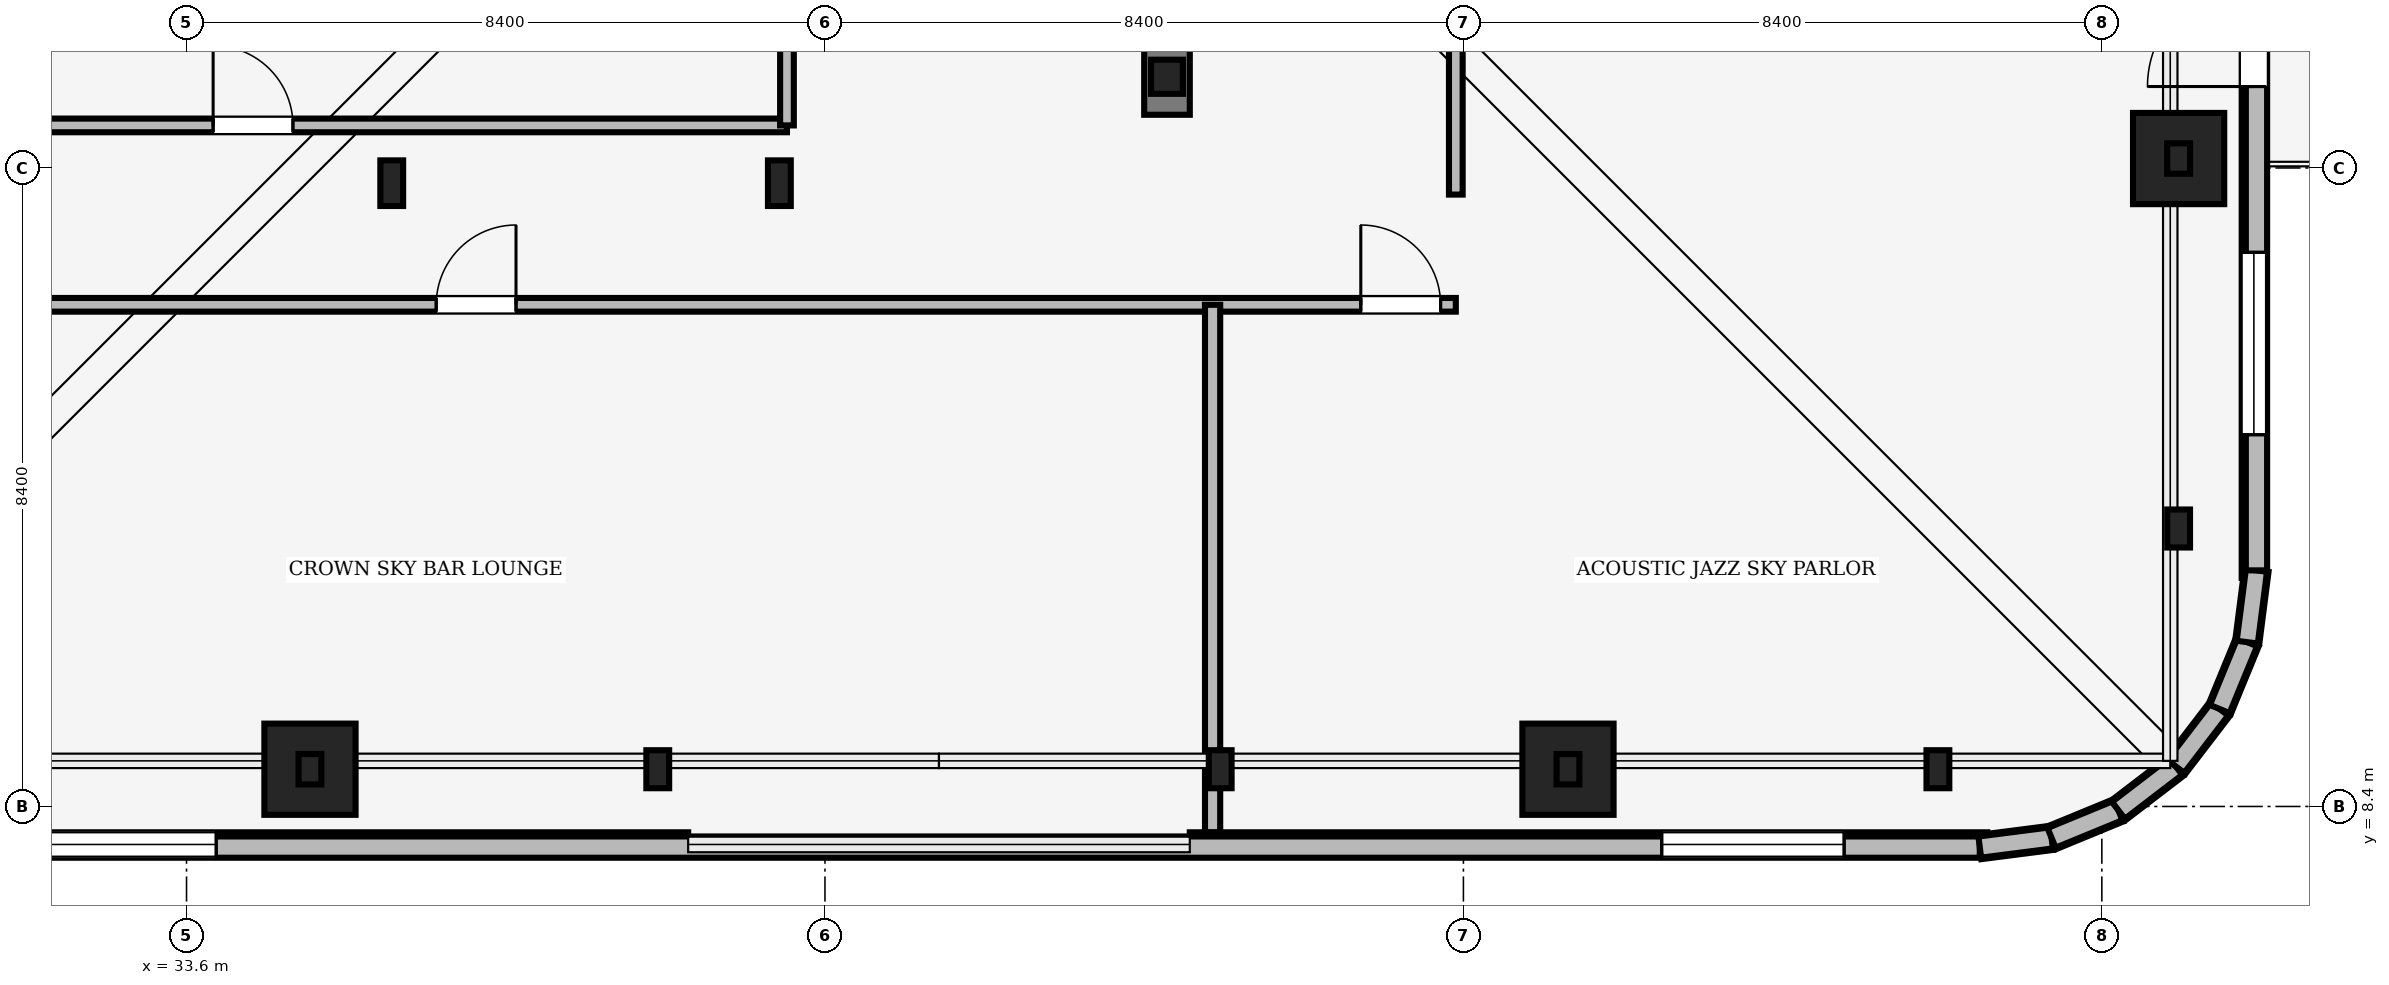
"""IFC4 building model, lengths in metres.
Left out: names, types, materials, properties, quantities, classifications, styles, units other than length and angle.
Written with IfcOpenShell. Run it as: python <this file> out.ifc"""

import sys

from ifc_helpers import new_model, si_unit, direction, frame, frame_2d, origin, origin_2d, place, context, subcontext, project, spatial, rectangle, i_section, extrude, source, transform, mapped, element, fill, save


model = new_model("IFC4")
c1 = context("Model", 3, precision=1e-05, world=origin(), true_north=direction((0.0, 1.0)))
c2 = subcontext(c1, "Body", "Model", "MODEL_VIEW")
j1 = project(units=[si_unit("LENGTHUNIT", "METRE"), si_unit("PLANEANGLEUNIT", "RADIAN")], contexts=[c1])
p1 = place(None, origin())
s1 = spatial("IfcSite", under=j1, at=p1, CompositionType="ELEMENT")
p2 = place(p1, origin())
s2 = spatial("IfcBuilding", under=s1, at=p2, CompositionType="ELEMENT")
p3 = place(p2, frame((0.0, 0.0, 301.15)))
s3 = spatial("IfcBuildingStorey", under=s2, at=p3, CompositionType="ELEMENT", Elevation=301.15)
m1 = source(origin(), c2, "Body", "SweptSolid", [
    extrude(rectangle(XDim=13.15, YDim=0.6, at=frame_2d((6.575, 0.0))), origin(), (0.0, 0.0, 1.0), 4.7),
])
p4 = place(p3, frame((46.5, 17.5, 0.0), z_axis=(0.0, 0.0, 1.0), x_axis=(0.0, 1.0, 0.0)))
e1 = element("IfcWall", 1, at=p4, inside=s3, PredefinedType="SHEAR", context=c2, shape_type="MappedRepresentation", body=[
    mapped(m1, transform((0.0, 0.0, 0.0), scale=1.0)),
])
m2 = source(origin(), c2, "Body", "SweptSolid", [
    extrude(i_section(OverallWidth=0.3, OverallDepth=0.6, WebThickness=0.015, FlangeThickness=0.03, FilletRadius=0.027, at=origin_2d()), origin(), (0.0, 0.0, 1.0), 4.6),
])
for number, where, z_axis, x_axis in (
    (2, (36.3, 16.6, 0.0), (0.0, 0.0, 1.0), (1.0, 0.0, 0.0)),
    (3, (41.4, 16.6, 0.0), (0.0, 0.0, 1.0), (1.0, 0.0, 0.0)),
):
    element("IfcColumn", number, at=place(p3, frame(where, z_axis=z_axis, x_axis=x_axis)), inside=s3, PredefinedType="COLUMN", context=c2, shape_type="MappedRepresentation", body=[
        mapped(m2, transform((0.0, 0.0, 0.0), scale=1.0)),
    ])
m3 = source(origin(), c2, "Body", "SweptSolid", [
    extrude(rectangle(XDim=1.2, YDim=1.2, at=origin_2d()), origin(), (0.0, 0.0, 1.0), 4.6),
])
for number, where, z_axis, x_axis in (
    (4, (35.224, 8.89, 0.0), (0.0, 0.0, 1.0), (1.0, 0.0, 0.0)),
    (5, (51.776, 8.89, 0.0), (0.0, 0.0, 1.0), (1.0, 0.0, 0.0)),
    (6, (59.81, 16.924, 0.0), (0.0, 0.0, 1.0), (1.0, 0.0, 0.0)),
):
    element("IfcColumn", number, at=place(p3, frame(where, z_axis=z_axis, x_axis=x_axis)), inside=s3, PredefinedType="COLUMN", context=c2, shape_type="MappedRepresentation", body=[
        mapped(m3, transform((0.0, 0.0, 0.0), scale=1.0)),
    ])
m4 = source(origin(), c2, "Body", "SweptSolid", [
    extrude(i_section(OverallWidth=0.3, OverallDepth=0.5, WebThickness=0.014, FlangeThickness=0.028, FilletRadius=0.027, at=origin_2d()), origin(), (0.0, 0.0, 1.0), 4.6),
])
for number, where, z_axis, x_axis in (
    (7, (39.8, 8.89, 0.0), (0.0, 0.0, 1.0), (1.0, 0.0, 0.0)),
    (8, (47.2, 8.89, 0.0), (0.0, 0.0, 1.0), (1.0, 0.0, 0.0)),
    (9, (56.643, 8.89, 0.0), (0.0, 0.0, 1.0), (1.0, 0.0, 0.0)),
    (10, (59.81, 12.057, 0.0), (0.0, 0.0, 1.0), (1.0, 0.0, 0.0)),
):
    element("IfcColumn", number, at=place(p3, frame(where, z_axis=z_axis, x_axis=x_axis)), inside=s3, PredefinedType="COLUMN", context=c2, shape_type="MappedRepresentation", body=[
        mapped(m4, transform((0.0, 0.0, 0.0), scale=1.0)),
    ])
m5 = source(origin(), c2, "Body", "SweptSolid", [
    extrude(i_section(OverallWidth=0.3, OverallDepth=0.4, WebThickness=0.013, FlangeThickness=0.024, FilletRadius=0.027, at=origin_2d()), origin(), (0.0, 0.0, 1.0), 12.85),
])
for number, where, z_axis, x_axis in (
    (11, (35.224, 8.89, 5.0), (0.0, 0.0, 1.0), (1.0, 0.0, 0.0)),
    (12, (51.776, 8.89, 5.0), (0.0, 0.0, 1.0), (1.0, 0.0, 0.0)),
    (13, (59.81, 16.924, 5.0), (0.0, 0.0, 1.0), (1.0, 0.0, 0.0)),
):
    element("IfcColumn", number, at=place(p3, frame(where, z_axis=z_axis, x_axis=x_axis)), inside=s3, PredefinedType="COLUMN", context=c2, shape_type="MappedRepresentation", body=[
        mapped(m5, transform((0.0, 0.0, 0.0), scale=1.0)),
    ])
m6 = source(origin(), c2, "Body", "SweptSolid", [
    extrude(i_section(OverallWidth=0.419, OverallDepth=0.449, WebThickness=0.031, FlangeThickness=0.048, FilletRadius=0.015, at=origin_2d()), origin(), (0.0, 0.0, 1.0), 4.6),
])
p5 = place(p3, frame((46.5, 18.0, 0.0), z_axis=(0.0, 0.0, 1.0), x_axis=(1.0, 0.0, 0.0)))
e14 = element("IfcColumn", 14, at=p5, inside=s3, PredefinedType="COLUMN", context=c2, shape_type="MappedRepresentation", body=[
    mapped(m6, transform((0.0, 0.0, 0.0), scale=1.0)),
])
m7 = source(origin(), c2, "Body", "SweptSolid", [
    extrude(rectangle(XDim=10.493, YDim=0.32, at=frame_2d((5.247, 0.0))), origin(), (0.0, 0.0, 1.0), 4.6),
])
p6 = place(p3, frame((29.707, 7.9, 0.0), z_axis=(0.0, 0.0, 1.0), x_axis=(1.0, 0.0, 0.0)))
e15 = element("IfcWall", 15, at=p6, inside=s3, PredefinedType="SOLIDWALL", context=c2, shape_type="MappedRepresentation", body=[
    mapped(m7, transform((0.0, 0.0, 0.0), scale=1.0)),
])
m8 = source(origin(), c2, "Body", "SweptSolid", [
    extrude(rectangle(XDim=2.4, YDim=3.2, at=frame_2d((1.2, 1.6))), frame((0.0, 0.17, 0.0), z_axis=(0.0, -1.0, 0.0), x_axis=(1.0, 0.0, 0.0)), (0.0, 0.0, 1.0), 0.34),
])
p7 = place(p6, frame((1.884, 0.0, 0.72)))
e16 = element("IfcOpeningElement", 16, at=p7, cuts=e15, PredefinedType="OPENING", context=c2, shape_type="MappedRepresentation", body=[
    mapped(m8, transform((0.0, 0.0, 0.0), scale=1.0)),
])
p8 = place(p3, frame((46.8, 7.9, 0.0), z_axis=(0.0, 0.0, 1.0), x_axis=(1.0, 0.0, 0.0)))
e17 = element("IfcWall", 17, at=p8, inside=s3, PredefinedType="SOLIDWALL", context=c2, shape_type="MappedRepresentation", body=[
    mapped(m7, transform((0.0, 0.0, 0.0), scale=1.0)),
])
p9 = place(p8, frame((6.209, 0.0, 0.72)))
e18 = element("IfcOpeningElement", 18, at=p9, cuts=e17, PredefinedType="OPENING", context=c2, shape_type="MappedRepresentation", body=[
    mapped(m8, transform((0.0, 0.0, 0.0), scale=1.0)),
])
p10 = place(p3, frame((60.8, 11.407, 0.0), z_axis=(0.0, 0.0, 1.0), x_axis=(0.0, 1.0, 0.0)))
e19 = element("IfcWall", 19, at=p10, inside=s3, PredefinedType="SOLIDWALL", context=c2, shape_type="MappedRepresentation", body=[
    mapped(m7, transform((0.0, 0.0, 0.0), scale=1.0)),
])
m9 = source(origin(), c2, "Body", "SweptSolid", [
    extrude(rectangle(XDim=1.4, YDim=2.3, at=frame_2d((0.7, 1.15))), frame((0.0, 0.17, 0.0), z_axis=(0.0, -1.0, 0.0), x_axis=(1.0, 0.0, 0.0)), (0.0, 0.0, 1.0), 0.34),
])
p11 = place(p10, frame((6.465, 0.0, 0.0)))
e20 = element("IfcOpeningElement", 20, at=p11, cuts=e19, PredefinedType="OPENING", context=c2, shape_type="MappedRepresentation", body=[
    mapped(m9, transform((0.0, 0.0, 0.0), scale=1.0)),
])
p12 = place(p10, frame((1.884, 0.0, 0.72)))
e21 = element("IfcOpeningElement", 21, at=p12, cuts=e19, PredefinedType="OPENING", context=c2, shape_type="MappedRepresentation", body=[
    mapped(m8, transform((0.0, 0.0, 0.0), scale=1.0)),
])
m10 = source(origin(), c2, "Body", "SweptSolid", [
    extrude(rectangle(XDim=0.952, YDim=0.32, at=frame_2d((0.476, 0.0))), origin(), (0.0, 0.0, 1.0), 4.6),
])
p13 = place(p3, frame((57.194, 7.865, 0.0), z_axis=(0.0, 0.0, 1.0), x_axis=(0.991850128376, 0.127410057845, 0.0)))
e22 = element("IfcWall", 22, at=p13, inside=s3, PredefinedType="SOLIDWALL", context=c2, shape_type="MappedRepresentation", body=[
    mapped(m10, transform((0.0, 0.0, 0.0), scale=1.0)),
])
m11 = source(origin(), c2, "Body", "SweptSolid", [
    extrude(rectangle(XDim=0.951, YDim=0.32, at=frame_2d((0.476, 0.0))), origin(), (0.0, 0.0, 1.0), 4.6),
])
p14 = place(p3, frame((58.138, 7.987, 0.0), z_axis=(0.0, 0.0, 1.0), x_axis=(0.924731243055, 0.380620714252, 0.0)))
e23 = element("IfcWall", 23, at=p14, inside=s3, PredefinedType="SOLIDWALL", context=c2, shape_type="MappedRepresentation", body=[
    mapped(m11, transform((0.0, 0.0, 0.0), scale=1.0)),
])
m12 = source(origin(), c2, "Body", "SweptSolid", [
    extrude(rectangle(XDim=0.951, YDim=0.32, at=frame_2d((0.475, 0.0))), origin(), (0.0, 0.0, 1.0), 4.6),
])
for number, where, z_axis, x_axis in (
    (24, (59.018, 8.349, 0.0), (0.0, 0.0, 1.0), (0.794, 0.608, 0.0)),
    (25, (59.773, 8.927, 0.0), (0.0, 0.0, 1.0), (0.608, 0.794, 0.0)),
):
    element("IfcWall", number, at=place(p3, frame(where, z_axis=z_axis, x_axis=x_axis)), inside=s3, PredefinedType="SOLIDWALL", context=c2, shape_type="MappedRepresentation", body=[
        mapped(m12, transform((0.0, 0.0, 0.0), scale=1.0)),
    ])
p15 = place(p3, frame((60.351, 9.682, 0.0), z_axis=(0.0, 0.0, 1.0), x_axis=(0.380620714252, 0.924731243055, 0.0)))
e26 = element("IfcWall", 26, at=p15, inside=s3, PredefinedType="SOLIDWALL", context=c2, shape_type="MappedRepresentation", body=[
    mapped(m11, transform((0.0, 0.0, 0.0), scale=1.0)),
])
p16 = place(p3, frame((60.713, 10.562, 0.0), z_axis=(0.0, 0.0, 1.0), x_axis=(0.127410057845, 0.991850128376, 0.0)))
e27 = element("IfcWall", 27, at=p16, inside=s3, PredefinedType="SOLIDWALL", context=c2, shape_type="MappedRepresentation", body=[
    mapped(m10, transform((0.0, 0.0, 0.0), scale=1.0)),
])
m13 = source(origin(), c2, "Body", "SweptSolid", [
    extrude(rectangle(XDim=27.388, YDim=0.28, at=frame_2d((13.694, 0.0))), origin(), (0.0, 0.0, 1.0), 1.15),
])
p17 = place(p3, frame((29.806, 7.865, 5.0), z_axis=(0.0, 0.0, 1.0), x_axis=(1.0, 0.0, 0.0)))
e28 = element("IfcWall", 28, at=p17, inside=s3, PredefinedType="SOLIDWALL", context=c2, shape_type="MappedRepresentation", body=[
    mapped(m13, transform((0.0, 0.0, 0.0), scale=1.0)),
])
m14 = source(origin(), c2, "Body", "SweptSolid", [
    extrude(rectangle(XDim=0.952, YDim=0.28, at=frame_2d((0.476, 0.0))), origin(), (0.0, 0.0, 1.0), 1.15),
])
p18 = place(p3, frame((57.194, 7.865, 5.0), z_axis=(0.0, 0.0, 1.0), x_axis=(0.991850128376, 0.127410057845, 0.0)))
e29 = element("IfcWall", 29, at=p18, inside=s3, PredefinedType="SOLIDWALL", context=c2, shape_type="MappedRepresentation", body=[
    mapped(m14, transform((0.0, 0.0, 0.0), scale=1.0)),
])
m15 = source(origin(), c2, "Body", "SweptSolid", [
    extrude(rectangle(XDim=0.951, YDim=0.28, at=frame_2d((0.476, 0.0))), origin(), (0.0, 0.0, 1.0), 1.15),
])
p19 = place(p3, frame((58.138, 7.987, 5.0), z_axis=(0.0, 0.0, 1.0), x_axis=(0.924731243055, 0.380620714252, 0.0)))
e30 = element("IfcWall", 30, at=p19, inside=s3, PredefinedType="SOLIDWALL", context=c2, shape_type="MappedRepresentation", body=[
    mapped(m15, transform((0.0, 0.0, 0.0), scale=1.0)),
])
m16 = source(origin(), c2, "Body", "SweptSolid", [
    extrude(rectangle(XDim=0.951, YDim=0.28, at=frame_2d((0.475, 0.0))), origin(), (0.0, 0.0, 1.0), 1.15),
])
for number, where, z_axis, x_axis in (
    (31, (59.018, 8.349, 5.0), (0.0, 0.0, 1.0), (0.794, 0.608, 0.0)),
    (32, (59.773, 8.927, 5.0), (0.0, 0.0, 1.0), (0.608, 0.794, 0.0)),
):
    element("IfcWall", number, at=place(p3, frame(where, z_axis=z_axis, x_axis=x_axis)), inside=s3, PredefinedType="SOLIDWALL", context=c2, shape_type="MappedRepresentation", body=[
        mapped(m16, transform((0.0, 0.0, 0.0), scale=1.0)),
    ])
p20 = place(p3, frame((60.351, 9.682, 5.0), z_axis=(0.0, 0.0, 1.0), x_axis=(0.380620714252, 0.924731243055, 0.0)))
e33 = element("IfcWall", 33, at=p20, inside=s3, PredefinedType="SOLIDWALL", context=c2, shape_type="MappedRepresentation", body=[
    mapped(m15, transform((0.0, 0.0, 0.0), scale=1.0)),
])
p21 = place(p3, frame((60.713, 10.562, 5.0), z_axis=(0.0, 0.0, 1.0), x_axis=(0.127410057845, 0.991850128376, 0.0)))
e34 = element("IfcWall", 34, at=p21, inside=s3, PredefinedType="SOLIDWALL", context=c2, shape_type="MappedRepresentation", body=[
    mapped(m14, transform((0.0, 0.0, 0.0), scale=1.0)),
])
p22 = place(p3, frame((60.834, 11.506, 5.0), z_axis=(0.0, 0.0, 1.0), x_axis=(0.0, 1.0, 0.0)))
e35 = element("IfcWall", 35, at=p22, inside=s3, PredefinedType="SOLIDWALL", context=c2, shape_type="MappedRepresentation", body=[
    mapped(m13, transform((0.0, 0.0, 0.0), scale=1.0)),
])
m17 = source(origin(), c2, "Body", "SweptSolid", [
    extrude(rectangle(XDim=25.888, YDim=0.18, at=frame_2d((12.944, 0.0))), origin(), (0.0, 0.0, 1.0), 4.142),
])
p23 = place(p3, frame((50.3, 16.45, 0.0), z_axis=(0.0, 0.0, 1.0), x_axis=(0.0, 1.0, 0.0)))
e36 = element("IfcWall", 36, at=p23, inside=s3, PredefinedType="PARTITIONING", context=c2, shape_type="MappedRepresentation", body=[
    mapped(m17, transform((0.0, 0.0, 0.0), scale=1.0)),
])
m18 = source(origin(), c2, "Body", "SweptSolid", [
    extrude(rectangle(XDim=1.05, YDim=2.2, at=frame_2d((0.525, 1.1))), frame((0.0, 0.1, 0.0), z_axis=(0.0, -1.0, 0.0), x_axis=(1.0, 0.0, 0.0)), (0.0, 0.0, 1.0), 0.2),
])
p24 = place(p23, frame((2.88, 0.0, 0.0)))
e37 = element("IfcOpeningElement", 37, at=p24, cuts=e36, PredefinedType="OPENING", context=c2, shape_type="MappedRepresentation", body=[
    mapped(m18, transform((0.0, 0.0, 0.0), scale=1.0)),
])
p25 = place(p23, frame((9.53, 0.0, 0.0)))
e38 = element("IfcOpeningElement", 38, at=p25, cuts=e36, PredefinedType="OPENING", context=c2, shape_type="MappedRepresentation", body=[
    mapped(m18, transform((0.0, 0.0, 0.0), scale=1.0)),
])
p26 = place(p23, frame((15.83, 0.0, 0.0)))
e39 = element("IfcOpeningElement", 39, at=p26, cuts=e36, PredefinedType="OPENING", context=c2, shape_type="MappedRepresentation", body=[
    mapped(m18, transform((0.0, 0.0, 0.0), scale=1.0)),
])
p27 = place(p23, frame((22.085, 0.0, 0.0)))
e40 = element("IfcOpeningElement", 40, at=p27, cuts=e36, PredefinedType="OPENING", context=c2, shape_type="MappedRepresentation", body=[
    mapped(m18, transform((0.0, 0.0, 0.0), scale=1.0)),
])
m19 = source(origin(), c2, "Body", "SweptSolid", [
    extrude(rectangle(XDim=23.938, YDim=0.18, at=frame_2d((11.969, 0.0))), origin(), (0.0, 0.0, 1.0), 4.142),
])
p28 = place(p3, frame((26.362, 15.0, 0.0), z_axis=(0.0, 0.0, 1.0), x_axis=(1.0, 0.0, 0.0)))
e41 = element("IfcWall", 41, at=p28, inside=s3, PredefinedType="PARTITIONING", context=c2, shape_type="MappedRepresentation", body=[
    mapped(m19, transform((0.0, 0.0, 0.0), scale=1.0)),
])
p29 = place(p28, frame((10.523, 0.0, 0.0)))
e42 = element("IfcOpeningElement", 42, at=p29, cuts=e41, PredefinedType="OPENING", context=c2, shape_type="MappedRepresentation", body=[
    mapped(m18, transform((0.0, 0.0, 0.0), scale=1.0)),
])
p30 = place(p28, frame((22.688, 0.0, 0.0)))
e43 = element("IfcOpeningElement", 43, at=p30, cuts=e41, PredefinedType="OPENING", context=c2, shape_type="MappedRepresentation", body=[
    mapped(m18, transform((0.0, 0.0, 0.0), scale=1.0)),
])
m20 = source(origin(), c2, "Body", "SweptSolid", [
    extrude(rectangle(XDim=13.05, YDim=0.18, at=frame_2d((6.525, 0.0))), origin(), (0.0, 0.0, 1.0), 2.792),
])
p31 = place(p3, frame((28.45, 17.36, 0.0), z_axis=(0.0, 0.0, 1.0), x_axis=(1.0, 0.0, 0.0)))
e44 = element("IfcWall", 44, at=p31, inside=s3, PredefinedType="PARTITIONING", context=c2, shape_type="MappedRepresentation", body=[
    mapped(m20, transform((0.0, 0.0, 0.0), scale=1.0)),
])
p32 = place(p31, frame((5.5, 0.0, 0.0)))
e45 = element("IfcOpeningElement", 45, at=p32, cuts=e44, PredefinedType="OPENING", context=c2, shape_type="MappedRepresentation", body=[
    mapped(m18, transform((0.0, 0.0, 0.0), scale=1.0)),
])
m21 = source(origin(), c2, "Body", "SweptSolid", [
    extrude(rectangle(XDim=6.938, YDim=0.2, at=frame_2d((3.469, 0.0))), origin(), (0.0, 0.0, 1.0), 4.142),
])
p33 = place(p3, frame((47.1, 8.062, 0.0), z_axis=(0.0, 0.0, 1.0), x_axis=(0.0, 1.0, 0.0)))
e46 = element("IfcWall", 46, at=p33, inside=s3, PredefinedType="PARTITIONING", context=c2, shape_type="MappedRepresentation", body=[
    mapped(m21, transform((0.0, 0.0, 0.0), scale=1.0)),
])
m22 = source(origin(), c2, "Body", "SweptSolid", [
    extrude(rectangle(XDim=2.94, YDim=0.18, at=frame_2d((1.47, 0.0))), origin(), (0.0, 0.0, 1.0), 2.792),
])
p34 = place(p3, frame((41.5, 17.36, 0.0), z_axis=(0.0, 0.0, 1.0), x_axis=(0.0, 1.0, 0.0)))
e47 = element("IfcWall", 47, at=p34, inside=s3, PredefinedType="PARTITIONING", context=c2, shape_type="MappedRepresentation", body=[
    mapped(m22, transform((0.0, 0.0, 0.0), scale=1.0)),
])
m23 = source(origin(), c2, "Body", "SweptSolid", [
    extrude(rectangle(XDim=2.4, YDim=3.2, at=frame_2d((1.2, 1.6))), frame((0.0, 0.03, 0.0), z_axis=(0.0, -1.0, 0.0), x_axis=(1.0, 0.0, 0.0)), (0.0, 0.0, 1.0), 0.06),
])
p35 = place(p7, origin())
e48 = element("IfcWindow", 48, at=p35, inside=s3, PartitioningType="SINGLE_PANEL", PredefinedType="WINDOW", context=c2, shape_type="MappedRepresentation", body=[
    mapped(m23, transform((0.0, 0.0, 0.0), scale=1.0)),
])
fill(e16, e48)
p36 = place(p9, origin())
e49 = element("IfcWindow", 49, at=p36, inside=s3, PartitioningType="SINGLE_PANEL", PredefinedType="WINDOW", context=c2, shape_type="MappedRepresentation", body=[
    mapped(m23, transform((0.0, 0.0, 0.0), scale=1.0)),
])
fill(e18, e49)
m24 = source(origin(), c2, "Body", "SweptSolid", [
    extrude(rectangle(XDim=1.4, YDim=2.3, at=frame_2d((0.7, 1.15))), frame((0.0, 0.025, 0.0), z_axis=(0.0, -1.0, 0.0), x_axis=(1.0, 0.0, 0.0)), (0.0, 0.0, 1.0), 0.05),
])
p37 = place(p11, frame((1.4, 0.0, 0.0), z_axis=(0.0, 0.0, 1.0), x_axis=(-1.0, 0.0, 0.0)))
e50 = element("IfcDoor", 50, at=p37, inside=s3, OperationType="DOUBLE_DOOR_SLIDING", PredefinedType="DOOR", context=c2, shape_type="MappedRepresentation", body=[
    mapped(m24, transform((0.0, 0.0, 0.0), scale=1.0)),
])
fill(e20, e50)
p38 = place(p12, origin())
e51 = element("IfcWindow", 51, at=p38, inside=s3, PartitioningType="SINGLE_PANEL", PredefinedType="WINDOW", context=c2, shape_type="MappedRepresentation", body=[
    mapped(m23, transform((0.0, 0.0, 0.0), scale=1.0)),
])
fill(e21, e51)
m25 = source(origin(), c2, "Body", "SweptSolid", [
    extrude(rectangle(XDim=1.05, YDim=2.2, at=frame_2d((0.525, 1.1))), frame((0.0, 0.025, 0.0), z_axis=(0.0, -1.0, 0.0), x_axis=(1.0, 0.0, 0.0)), (0.0, 0.0, 1.0), 0.05),
])
p39 = place(p29, origin())
e52 = element("IfcDoor", 52, at=p39, inside=s3, OperationType="SINGLE_SWING_RIGHT", PredefinedType="DOOR", context=c2, shape_type="MappedRepresentation", body=[
    mapped(m25, transform((0.0, 0.0, 0.0), scale=1.0)),
])
fill(e42, e52)
p40 = place(p30, origin())
e53 = element("IfcDoor", 53, at=p40, inside=s3, OperationType="SINGLE_SWING_LEFT", PredefinedType="DOOR", context=c2, shape_type="MappedRepresentation", body=[
    mapped(m25, transform((0.0, 0.0, 0.0), scale=1.0)),
])
fill(e43, e53)
p41 = place(p32, origin())
e54 = element("IfcDoor", 54, at=p41, inside=s3, OperationType="SINGLE_SWING_LEFT", PredefinedType="DOOR", context=c2, shape_type="MappedRepresentation", body=[
    mapped(m25, transform((0.0, 0.0, 0.0), scale=1.0)),
])
fill(e45, e54)
save(model, sys.argv[1])
